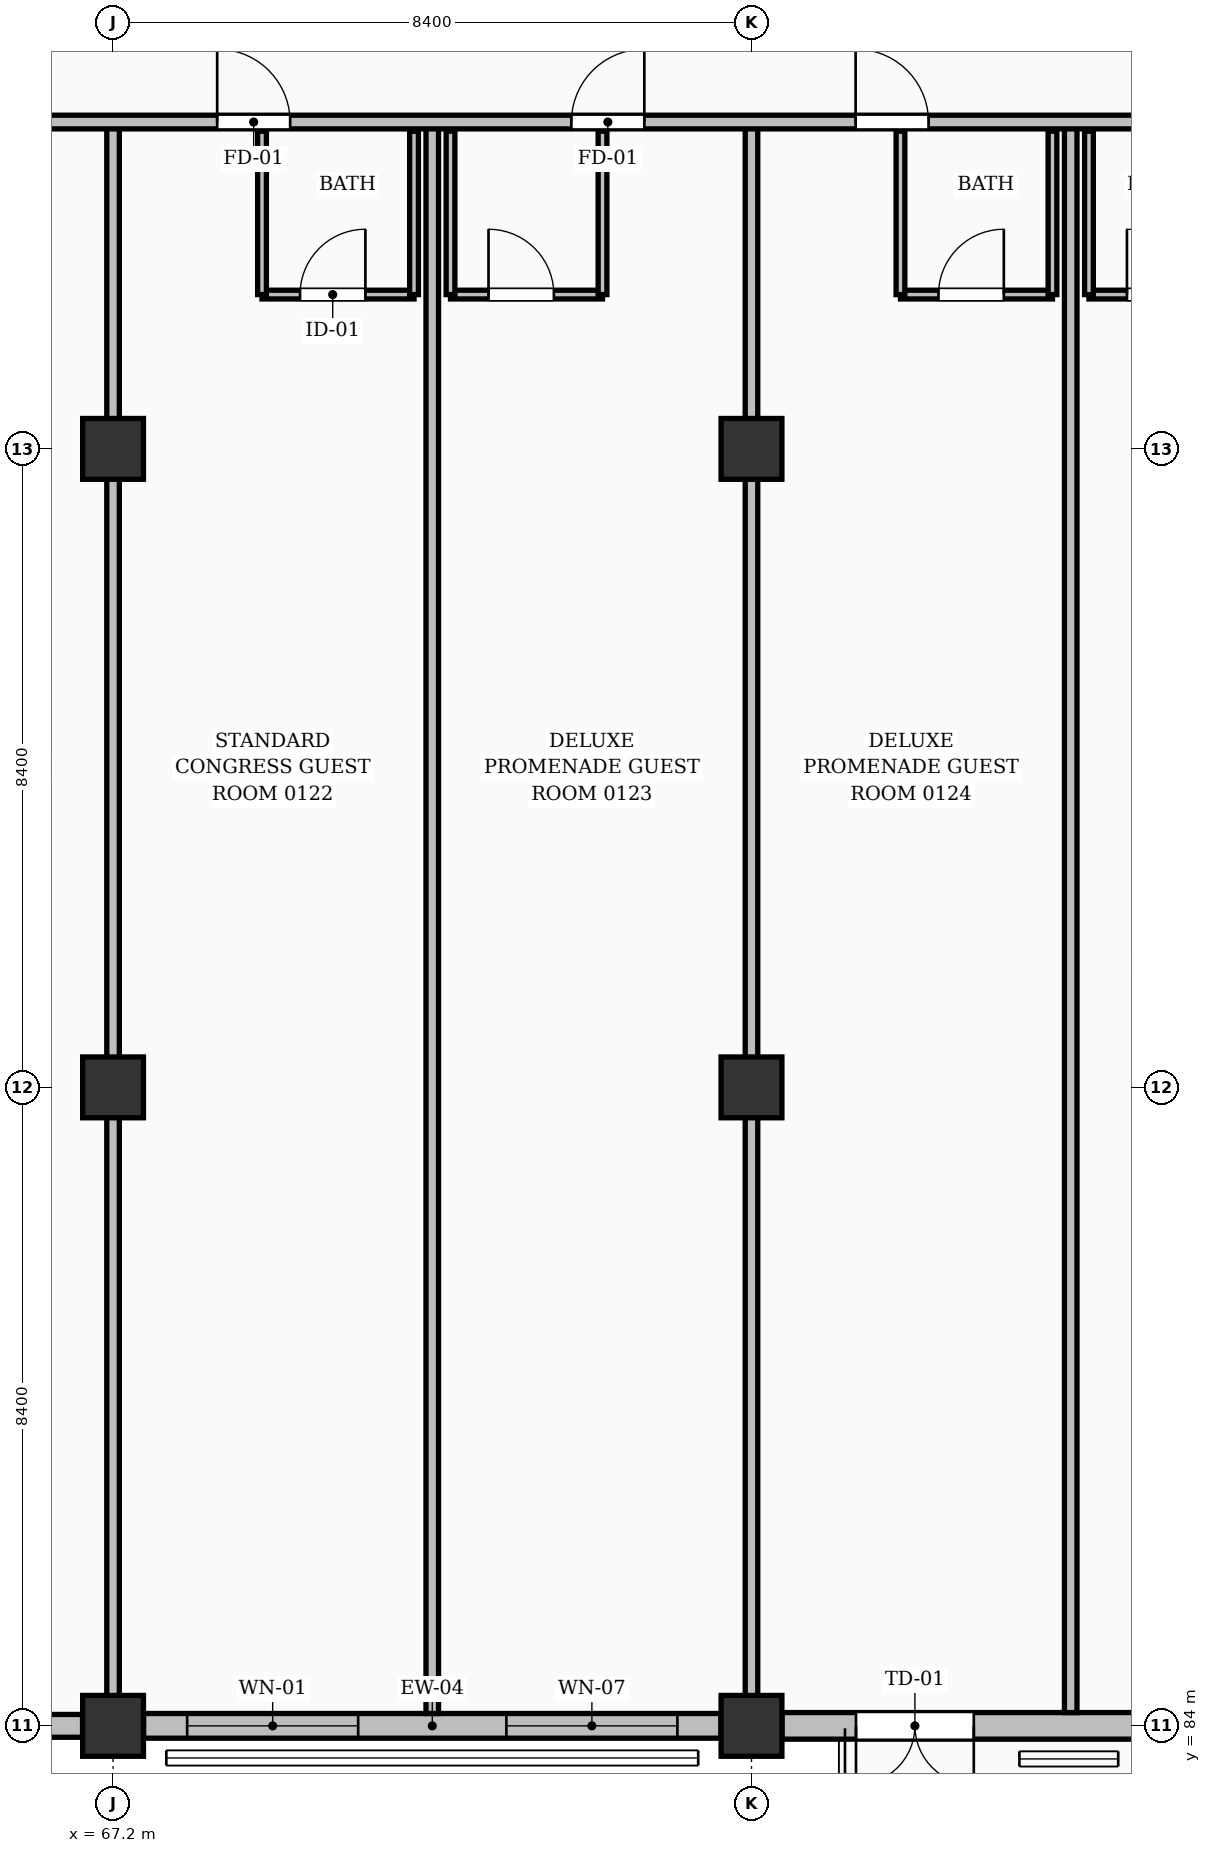
"""IFC4 building model, lengths in metres.
Left out: names, types, materials, properties, quantities, classifications, styles, units other than length and angle.
Written with IfcOpenShell. Run it as: python <this file> out.ifc"""

import sys

from ifc_helpers import new_model, si_unit, direction, frame, frame_2d, origin, origin_2d, place, context, subcontext, project, spatial, rectangle, extrude, element, fill, save


model = new_model("IFC4")
c1 = context("Model", 3, precision=1e-05, world=origin(), true_north=direction((0.0, 1.0)))
c2 = subcontext(c1, "Body", "Model", "MODEL_VIEW")
j1 = project(units=[si_unit("LENGTHUNIT", "METRE"), si_unit("PLANEANGLEUNIT", "RADIAN")], contexts=[c1])
p1 = place(None, origin())
s1 = spatial("IfcSite", under=j1, at=p1, CompositionType="ELEMENT")
p2 = place(p1, origin())
s2 = spatial("IfcBuilding", under=s1, at=p2, CompositionType="ELEMENT")
p3 = place(p2, frame((0.0, 0.0, 3.92)))
s3 = spatial("IfcBuildingStorey", under=s2, at=p3, CompositionType="ELEMENT", Elevation=3.92)
for number, where, z_axis, x_axis in (
    (1, (67.2, 84.0, 0.0), (0.0, 0.0, 1.0), (1.0, 0.0, 0.0)),
    (2, (67.2, 92.4, 0.0), (0.0, 0.0, 1.0), (1.0, 0.0, 0.0)),
    (3, (67.2, 100.8, 0.0), (0.0, 0.0, 1.0), (1.0, 0.0, 0.0)),
    (4, (75.6, 84.0, 0.0), (0.0, 0.0, 1.0), (1.0, 0.0, 0.0)),
    (5, (75.6, 92.4, 0.0), (0.0, 0.0, 1.0), (1.0, 0.0, 0.0)),
    (6, (75.6, 100.8, 0.0), (0.0, 0.0, 1.0), (1.0, 0.0, 0.0)),
):
    element("IfcColumn", number, at=place(p3, frame(where, z_axis=z_axis, x_axis=x_axis)), inside=s3, PredefinedType="COLUMN", context=c2, shape_type="SweptSolid", body=[
        extrude(rectangle(XDim=0.8, YDim=0.8, at=origin_2d()), origin(), (0.0, 0.0, 1.0), 3.64),
    ])
p4 = place(p3, frame((59.201, 84.0, 0.0), z_axis=(0.0, 0.0, 1.0), x_axis=(1.0, 0.0, 0.0)))
e7 = element("IfcWall", 7, at=p4, inside=s3, PredefinedType="SOLIDWALL", context=c2, shape_type="SweptSolid", body=[
    extrude(rectangle(XDim=7.598, YDim=0.3, at=frame_2d((3.799, 0.0))), origin(), (0.0, 0.0, 1.0), 2.445),
])
p5 = place(p4, frame((0.874, 0.0, 0.0)))
e8 = element("IfcOpeningElement", 8, at=p5, cuts=e7, PredefinedType="OPENING", context=c2, shape_type="SweptSolid", body=[
    extrude(rectangle(XDim=1.75, YDim=2.08, at=frame_2d((0.875, 1.04))), frame((0.0, 0.16, 0.0), z_axis=(0.0, -1.0, 0.0), x_axis=(1.0, 0.0, 0.0)), (0.0, 0.0, 1.0), 0.32),
])
p6 = place(p4, frame((4.559, 0.0, 0.25)))
e9 = element("IfcOpeningElement", 9, at=p6, cuts=e7, PredefinedType="OPENING", context=c2, shape_type="SweptSolid", body=[
    extrude(rectangle(XDim=2.38, YDim=2.0, at=frame_2d((1.19, 1.0))), frame((0.0, 0.16, 0.0), z_axis=(0.0, -1.0, 0.0), x_axis=(1.0, 0.0, 0.0)), (0.0, 0.0, 1.0), 0.32),
])
p7 = place(p3, frame((67.601, 84.0, 0.0), z_axis=(0.0, 0.0, 1.0), x_axis=(1.0, 0.0, 0.0)))
e10 = element("IfcWall", 10, at=p7, inside=s3, PredefinedType="SOLIDWALL", context=c2, shape_type="SweptSolid", body=[
    extrude(rectangle(XDim=7.598, YDim=0.325, at=frame_2d((3.799, 0.0))), origin(), (0.0, 0.0, 1.0), 2.445),
])
p8 = place(p7, frame((0.574, 0.0, 0.25)))
e11 = element("IfcOpeningElement", 11, at=p8, cuts=e10, PredefinedType="OPENING", context=c2, shape_type="SweptSolid", body=[
    extrude(rectangle(XDim=2.25, YDim=1.85, at=frame_2d((1.125, 0.925))), frame((0.0, 0.172, 0.0), z_axis=(0.0, -1.0, 0.0), x_axis=(1.0, 0.0, 0.0)), (0.0, 0.0, 1.0), 0.345),
])
p9 = place(p7, frame((4.774, 0.0, 0.25)))
e12 = element("IfcOpeningElement", 12, at=p9, cuts=e10, PredefinedType="OPENING", context=c2, shape_type="SweptSolid", body=[
    extrude(rectangle(XDim=2.25, YDim=1.95, at=frame_2d((1.125, 0.975))), frame((0.0, 0.172, 0.0), z_axis=(0.0, -1.0, 0.0), x_axis=(1.0, 0.0, 0.0)), (0.0, 0.0, 1.0), 0.345),
])
p10 = place(p3, frame((76.001, 84.0, 0.0), z_axis=(0.0, 0.0, 1.0), x_axis=(1.0, 0.0, 0.0)))
e13 = element("IfcWall", 13, at=p10, inside=s3, PredefinedType="SOLIDWALL", context=c2, shape_type="SweptSolid", body=[
    extrude(rectangle(XDim=7.548, YDim=0.35, at=frame_2d((3.774, 0.0))), origin(), (0.0, 0.0, 1.0), 2.445),
])
p11 = place(p10, frame((0.974, 0.0, 0.0)))
e14 = element("IfcOpeningElement", 14, at=p11, cuts=e13, PredefinedType="OPENING", context=c2, shape_type="SweptSolid", body=[
    extrude(rectangle(XDim=1.55, YDim=2.08, at=frame_2d((0.775, 1.04))), frame((0.0, 0.185, 0.0), z_axis=(0.0, -1.0, 0.0), x_axis=(1.0, 0.0, 0.0)), (0.0, 0.0, 1.0), 0.37),
])
p12 = place(p10, frame((4.624, 0.0, 0.25)))
e15 = element("IfcOpeningElement", 15, at=p12, cuts=e13, PredefinedType="OPENING", context=c2, shape_type="SweptSolid", body=[
    extrude(rectangle(XDim=2.25, YDim=1.95, at=frame_2d((1.125, 0.975))), frame((0.0, 0.185, 0.0), z_axis=(0.0, -1.0, 0.0), x_axis=(1.0, 0.0, 0.0)), (0.0, 0.0, 1.0), 0.37),
])
p13 = place(p3, frame((69.16, 102.83, 0.0), z_axis=(0.0, 0.0, 1.0), x_axis=(1.0, 0.0, 0.0)))
e16 = element("IfcWall", 16, at=p13, inside=s3, PredefinedType="PARTITIONING", context=c2, shape_type="SweptSolid", body=[
    extrude(rectangle(XDim=2.0, YDim=0.115, at=frame_2d((1.0, 0.0))), origin(), (0.0, 0.0, 1.0), 3.36),
])
p14 = place(p13, frame((0.5, 0.0, 0.0)))
e17 = element("IfcOpeningElement", 17, at=p14, cuts=e16, PredefinedType="OPENING", context=c2, shape_type="SweptSolid", body=[
    extrude(rectangle(XDim=0.86, YDim=2.05, at=frame_2d((0.43, 1.025))), frame((0.0, 0.067, 0.0), z_axis=(0.0, -1.0, 0.0), x_axis=(1.0, 0.0, 0.0)), (0.0, 0.0, 1.0), 0.135),
])
for number, where, z_axis, x_axis in (
    (18, (69.16, 102.83, 0.0), (0.0, 0.0, 1.0), (0.0, 1.0, 0.0)),
    (19, (71.16, 102.83, 0.0), (0.0, 0.0, 1.0), (0.0, 1.0, 0.0)),
):
    element("IfcWall", number, at=place(p3, frame(where, z_axis=z_axis, x_axis=x_axis)), inside=s3, PredefinedType="PARTITIONING", context=c2, shape_type="SweptSolid", body=[
        extrude(rectangle(XDim=2.15, YDim=0.115, at=frame_2d((1.075, 0.0))), origin(), (0.0, 0.0, 1.0), 3.36),
    ])
p15 = place(p3, frame((71.64, 102.83, 0.0), z_axis=(0.0, 0.0, 1.0), x_axis=(1.0, 0.0, 0.0)))
e20 = element("IfcWall", 20, at=p15, inside=s3, PredefinedType="PARTITIONING", context=c2, shape_type="SweptSolid", body=[
    extrude(rectangle(XDim=2.0, YDim=0.115, at=frame_2d((1.0, 0.0))), origin(), (0.0, 0.0, 1.0), 3.36),
])
p16 = place(p15, frame((0.5, 0.0, 0.0)))
e21 = element("IfcOpeningElement", 21, at=p16, cuts=e20, PredefinedType="OPENING", context=c2, shape_type="SweptSolid", body=[
    extrude(rectangle(XDim=0.86, YDim=2.05, at=frame_2d((0.43, 1.025))), frame((0.0, 0.067, 0.0), z_axis=(0.0, -1.0, 0.0), x_axis=(1.0, 0.0, 0.0)), (0.0, 0.0, 1.0), 0.135),
])
for number, where, z_axis, x_axis in (
    (22, (71.64, 102.83, 0.0), (0.0, 0.0, 1.0), (0.0, 1.0, 0.0)),
    (23, (73.64, 102.83, 0.0), (0.0, 0.0, 1.0), (0.0, 1.0, 0.0)),
):
    element("IfcWall", number, at=place(p3, frame(where, z_axis=z_axis, x_axis=x_axis)), inside=s3, PredefinedType="PARTITIONING", context=c2, shape_type="SweptSolid", body=[
        extrude(rectangle(XDim=2.15, YDim=0.115, at=frame_2d((1.075, 0.0))), origin(), (0.0, 0.0, 1.0), 3.36),
    ])
p17 = place(p3, frame((71.4, 84.163, 0.0), z_axis=(0.0, 0.0, 1.0), x_axis=(0.0, 1.0, 0.0)))
e24 = element("IfcWall", 24, at=p17, inside=s3, PredefinedType="PARTITIONING", context=c2, shape_type="SweptSolid", body=[
    extrude(rectangle(XDim=20.938, YDim=0.165, at=frame_2d((10.469, 0.0))), origin(), (0.0, 0.0, 1.0), 3.36),
])
p18 = place(p3, frame((67.2, 84.35, 0.0), z_axis=(0.0, 0.0, 1.0), x_axis=(0.0, 1.0, 0.0)))
e25 = element("IfcWall", 25, at=p18, inside=s3, PredefinedType="PARTITIONING", context=c2, shape_type="SweptSolid", body=[
    extrude(rectangle(XDim=20.75, YDim=0.165, at=frame_2d((10.375, 0.0))), origin(), (0.0, 0.0, 1.0), 2.495),
])
p19 = place(p3, frame((77.56, 102.83, 0.0), z_axis=(0.0, 0.0, 1.0), x_axis=(1.0, 0.0, 0.0)))
e26 = element("IfcWall", 26, at=p19, inside=s3, PredefinedType="PARTITIONING", context=c2, shape_type="SweptSolid", body=[
    extrude(rectangle(XDim=2.0, YDim=0.115, at=frame_2d((1.0, 0.0))), origin(), (0.0, 0.0, 1.0), 3.36),
])
p20 = place(p19, frame((0.5, 0.0, 0.0)))
e27 = element("IfcOpeningElement", 27, at=p20, cuts=e26, PredefinedType="OPENING", context=c2, shape_type="SweptSolid", body=[
    extrude(rectangle(XDim=0.86, YDim=2.05, at=frame_2d((0.43, 1.025))), frame((0.0, 0.067, 0.0), z_axis=(0.0, -1.0, 0.0), x_axis=(1.0, 0.0, 0.0)), (0.0, 0.0, 1.0), 0.135),
])
for number, where, z_axis, x_axis in (
    (28, (77.56, 102.83, 0.0), (0.0, 0.0, 1.0), (0.0, 1.0, 0.0)),
    (29, (79.56, 102.83, 0.0), (0.0, 0.0, 1.0), (0.0, 1.0, 0.0)),
):
    element("IfcWall", number, at=place(p3, frame(where, z_axis=z_axis, x_axis=x_axis)), inside=s3, PredefinedType="PARTITIONING", context=c2, shape_type="SweptSolid", body=[
        extrude(rectangle(XDim=2.15, YDim=0.115, at=frame_2d((1.075, 0.0))), origin(), (0.0, 0.0, 1.0), 3.36),
    ])
p21 = place(p3, frame((80.04, 102.83, 0.0), z_axis=(0.0, 0.0, 1.0), x_axis=(1.0, 0.0, 0.0)))
e30 = element("IfcWall", 30, at=p21, inside=s3, PredefinedType="PARTITIONING", context=c2, shape_type="SweptSolid", body=[
    extrude(rectangle(XDim=2.0, YDim=0.115, at=frame_2d((1.0, 0.0))), origin(), (0.0, 0.0, 1.0), 3.36),
])
p22 = place(p21, frame((0.5, 0.0, 0.0)))
e31 = element("IfcOpeningElement", 31, at=p22, cuts=e30, PredefinedType="OPENING", context=c2, shape_type="SweptSolid", body=[
    extrude(rectangle(XDim=0.86, YDim=2.05, at=frame_2d((0.43, 1.025))), frame((0.0, 0.067, 0.0), z_axis=(0.0, -1.0, 0.0), x_axis=(1.0, 0.0, 0.0)), (0.0, 0.0, 1.0), 0.135),
])
p23 = place(p3, frame((80.04, 102.83, 0.0), z_axis=(0.0, 0.0, 1.0), x_axis=(0.0, 1.0, 0.0)))
e32 = element("IfcWall", 32, at=p23, inside=s3, PredefinedType="PARTITIONING", context=c2, shape_type="SweptSolid", body=[
    extrude(rectangle(XDim=2.15, YDim=0.115, at=frame_2d((1.075, 0.0))), origin(), (0.0, 0.0, 1.0), 3.36),
])
p24 = place(p3, frame((79.8, 84.175, 0.0), z_axis=(0.0, 0.0, 1.0), x_axis=(0.0, 1.0, 0.0)))
e33 = element("IfcWall", 33, at=p24, inside=s3, PredefinedType="PARTITIONING", context=c2, shape_type="SweptSolid", body=[
    extrude(rectangle(XDim=20.925, YDim=0.165, at=frame_2d((10.462, 0.0))), origin(), (0.0, 0.0, 1.0), 3.36),
])
p25 = place(p3, frame((75.6, 84.35, 0.0), z_axis=(0.0, 0.0, 1.0), x_axis=(0.0, 1.0, 0.0)))
e34 = element("IfcWall", 34, at=p25, inside=s3, PredefinedType="PARTITIONING", context=c2, shape_type="SweptSolid", body=[
    extrude(rectangle(XDim=20.75, YDim=0.165, at=frame_2d((10.375, 0.0))), origin(), (0.0, 0.0, 1.0), 2.495),
])
p26 = place(p3, frame((54.4, 105.1, 0.0), z_axis=(0.0, 0.0, 1.0), x_axis=(1.0, 0.0, 0.0)))
e35 = element("IfcWall", 35, at=p26, inside=s3, PredefinedType="PARTITIONING", context=c2, shape_type="SweptSolid", body=[
    extrude(rectangle(XDim=29.41, YDim=0.18, at=frame_2d((14.705, 0.0))), origin(), (0.0, 0.0, 1.0), 3.36),
])
p27 = place(p26, frame((2.03, 0.0, 0.0)))
e36 = element("IfcOpeningElement", 36, at=p27, cuts=e35, PredefinedType="OPENING", context=c2, shape_type="SweptSolid", body=[
    extrude(rectangle(XDim=0.96, YDim=2.15, at=frame_2d((0.48, 1.075))), frame((0.0, 0.1, 0.0), z_axis=(0.0, -1.0, 0.0), x_axis=(1.0, 0.0, 0.0)), (0.0, 0.0, 1.0), 0.2),
])
p28 = place(p26, frame((5.77, 0.0, 0.0)))
e37 = element("IfcOpeningElement", 37, at=p28, cuts=e35, PredefinedType="OPENING", context=c2, shape_type="SweptSolid", body=[
    extrude(rectangle(XDim=0.96, YDim=2.15, at=frame_2d((0.48, 1.075))), frame((0.0, 0.1, 0.0), z_axis=(0.0, -1.0, 0.0), x_axis=(1.0, 0.0, 0.0)), (0.0, 0.0, 1.0), 0.2),
])
p29 = place(p26, frame((10.43, 0.0, 0.0)))
e38 = element("IfcOpeningElement", 38, at=p29, cuts=e35, PredefinedType="OPENING", context=c2, shape_type="SweptSolid", body=[
    extrude(rectangle(XDim=0.96, YDim=2.15, at=frame_2d((0.48, 1.075))), frame((0.0, 0.1, 0.0), z_axis=(0.0, -1.0, 0.0), x_axis=(1.0, 0.0, 0.0)), (0.0, 0.0, 1.0), 0.2),
])
p30 = place(p26, frame((14.17, 0.0, 0.0)))
e39 = element("IfcOpeningElement", 39, at=p30, cuts=e35, PredefinedType="OPENING", context=c2, shape_type="SweptSolid", body=[
    extrude(rectangle(XDim=0.96, YDim=2.15, at=frame_2d((0.48, 1.075))), frame((0.0, 0.1, 0.0), z_axis=(0.0, -1.0, 0.0), x_axis=(1.0, 0.0, 0.0)), (0.0, 0.0, 1.0), 0.2),
])
p31 = place(p26, frame((18.83, 0.0, 0.0)))
e40 = element("IfcOpeningElement", 40, at=p31, cuts=e35, PredefinedType="OPENING", context=c2, shape_type="SweptSolid", body=[
    extrude(rectangle(XDim=0.96, YDim=2.15, at=frame_2d((0.48, 1.075))), frame((0.0, 0.1, 0.0), z_axis=(0.0, -1.0, 0.0), x_axis=(1.0, 0.0, 0.0)), (0.0, 0.0, 1.0), 0.2),
])
p32 = place(p26, frame((22.57, 0.0, 0.0)))
e41 = element("IfcOpeningElement", 41, at=p32, cuts=e35, PredefinedType="OPENING", context=c2, shape_type="SweptSolid", body=[
    extrude(rectangle(XDim=0.96, YDim=2.15, at=frame_2d((0.48, 1.075))), frame((0.0, 0.1, 0.0), z_axis=(0.0, -1.0, 0.0), x_axis=(1.0, 0.0, 0.0)), (0.0, 0.0, 1.0), 0.2),
])
p33 = place(p26, frame((27.23, 0.0, 0.0)))
e42 = element("IfcOpeningElement", 42, at=p33, cuts=e35, PredefinedType="OPENING", context=c2, shape_type="SweptSolid", body=[
    extrude(rectangle(XDim=0.96, YDim=2.15, at=frame_2d((0.48, 1.075))), frame((0.0, 0.1, 0.0), z_axis=(0.0, -1.0, 0.0), x_axis=(1.0, 0.0, 0.0)), (0.0, 0.0, 1.0), 0.2),
])
p34 = place(p8, origin())
e43 = element("IfcWindow", 43, at=p34, inside=s3, PartitioningType="DOUBLE_PANEL_VERTICAL", PredefinedType="WINDOW", context=c2, shape_type="SweptSolid", body=[
    extrude(rectangle(XDim=2.25, YDim=1.85, at=frame_2d((1.125, 0.925))), frame((0.0, 0.03, 0.0), z_axis=(0.0, -1.0, 0.0), x_axis=(1.0, 0.0, 0.0)), (0.0, 0.0, 1.0), 0.06),
])
fill(e11, e43)
p35 = place(p9, origin())
e44 = element("IfcWindow", 44, at=p35, inside=s3, PartitioningType="DOUBLE_PANEL_VERTICAL", PredefinedType="WINDOW", context=c2, shape_type="SweptSolid", body=[
    extrude(rectangle(XDim=2.25, YDim=1.95, at=frame_2d((1.125, 0.975))), frame((0.0, 0.03, 0.0), z_axis=(0.0, -1.0, 0.0), x_axis=(1.0, 0.0, 0.0)), (0.0, 0.0, 1.0), 0.06),
])
fill(e12, e44)
p36 = place(p11, frame((1.55, 0.0, 0.0), z_axis=(0.0, 0.0, 1.0), x_axis=(-1.0, 0.0, 0.0)))
e45 = element("IfcDoor", 45, at=p36, inside=s3, OperationType="DOUBLE_DOOR_SINGLE_SWING", PredefinedType="DOOR", context=c2, shape_type="SweptSolid", body=[
    extrude(rectangle(XDim=1.55, YDim=2.08, at=frame_2d((0.775, 1.04))), frame((0.0, 0.025, 0.0), z_axis=(0.0, -1.0, 0.0), x_axis=(1.0, 0.0, 0.0)), (0.0, 0.0, 1.0), 0.05),
])
fill(e14, e45)
p37 = place(p14, origin())
e46 = element("IfcDoor", 46, at=p37, inside=s3, OperationType="SINGLE_SWING_RIGHT", PredefinedType="DOOR", context=c2, shape_type="SweptSolid", body=[
    extrude(rectangle(XDim=0.86, YDim=2.05, at=frame_2d((0.43, 1.025))), frame((0.0, 0.025, 0.0), z_axis=(0.0, -1.0, 0.0), x_axis=(1.0, 0.0, 0.0)), (0.0, 0.0, 1.0), 0.05),
])
fill(e17, e46)
p38 = place(p16, origin())
e47 = element("IfcDoor", 47, at=p38, inside=s3, OperationType="SINGLE_SWING_LEFT", PredefinedType="DOOR", context=c2, shape_type="SweptSolid", body=[
    extrude(rectangle(XDim=0.86, YDim=2.05, at=frame_2d((0.43, 1.025))), frame((0.0, 0.025, 0.0), z_axis=(0.0, -1.0, 0.0), x_axis=(1.0, 0.0, 0.0)), (0.0, 0.0, 1.0), 0.05),
])
fill(e21, e47)
p39 = place(p20, origin())
e48 = element("IfcDoor", 48, at=p39, inside=s3, OperationType="SINGLE_SWING_RIGHT", PredefinedType="DOOR", context=c2, shape_type="SweptSolid", body=[
    extrude(rectangle(XDim=0.86, YDim=2.05, at=frame_2d((0.43, 1.025))), frame((0.0, 0.025, 0.0), z_axis=(0.0, -1.0, 0.0), x_axis=(1.0, 0.0, 0.0)), (0.0, 0.0, 1.0), 0.05),
])
fill(e27, e48)
p40 = place(p22, origin())
e49 = element("IfcDoor", 49, at=p40, inside=s3, OperationType="SINGLE_SWING_LEFT", PredefinedType="DOOR", context=c2, shape_type="SweptSolid", body=[
    extrude(rectangle(XDim=0.86, YDim=2.05, at=frame_2d((0.43, 1.025))), frame((0.0, 0.025, 0.0), z_axis=(0.0, -1.0, 0.0), x_axis=(1.0, 0.0, 0.0)), (0.0, 0.0, 1.0), 0.05),
])
fill(e31, e49)
p41 = place(p30, origin())
e50 = element("IfcDoor", 50, at=p41, inside=s3, OperationType="SINGLE_SWING_LEFT", PredefinedType="DOOR", context=c2, shape_type="SweptSolid", body=[
    extrude(rectangle(XDim=0.96, YDim=2.15, at=frame_2d((0.48, 1.075))), frame((0.0, 0.025, 0.0), z_axis=(0.0, -1.0, 0.0), x_axis=(1.0, 0.0, 0.0)), (0.0, 0.0, 1.0), 0.05),
])
fill(e39, e50)
p42 = place(p31, origin())
e51 = element("IfcDoor", 51, at=p42, inside=s3, OperationType="SINGLE_SWING_RIGHT", PredefinedType="DOOR", context=c2, shape_type="SweptSolid", body=[
    extrude(rectangle(XDim=0.96, YDim=2.15, at=frame_2d((0.48, 1.075))), frame((0.0, 0.025, 0.0), z_axis=(0.0, -1.0, 0.0), x_axis=(1.0, 0.0, 0.0)), (0.0, 0.0, 1.0), 0.05),
])
fill(e40, e51)
p43 = place(p32, origin())
e52 = element("IfcDoor", 52, at=p43, inside=s3, OperationType="SINGLE_SWING_LEFT", PredefinedType="DOOR", context=c2, shape_type="SweptSolid", body=[
    extrude(rectangle(XDim=0.96, YDim=2.15, at=frame_2d((0.48, 1.075))), frame((0.0, 0.025, 0.0), z_axis=(0.0, -1.0, 0.0), x_axis=(1.0, 0.0, 0.0)), (0.0, 0.0, 1.0), 0.05),
])
fill(e41, e52)
save(model, sys.argv[1])
